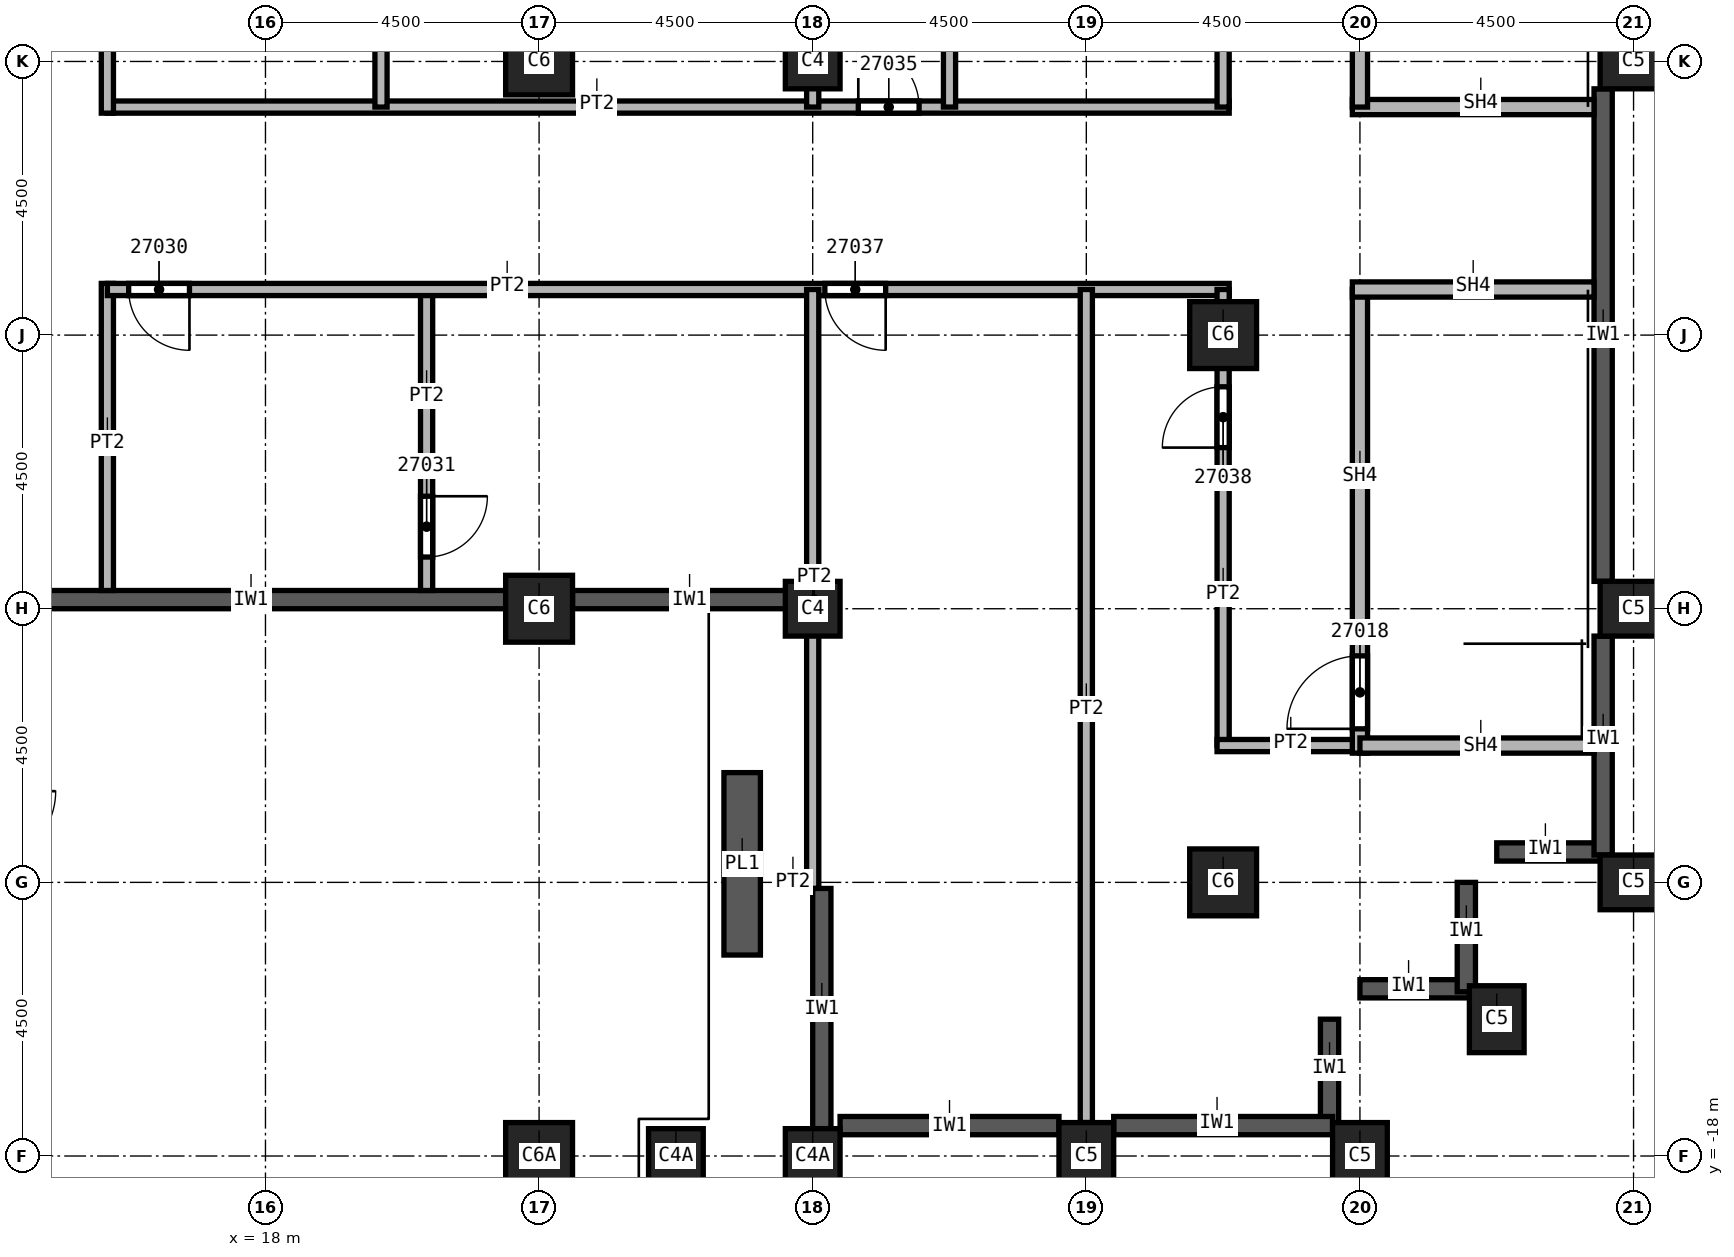
"""IFC4 building model, lengths in metres.
Left out: names, types, materials, properties, quantities, classifications, styles, units other than length and angle.
Written with IfcOpenShell. Run it as: python <this file> out.ifc"""

import sys

from ifc_helpers import new_model, si_unit, direction, frame, frame_2d, origin, origin_2d, place, context, subcontext, project, spatial, rectangle, extrude, element, fill, save


model = new_model("IFC4")
c1 = context("Model", 3, precision=1e-05, world=origin(), true_north=direction((0.0, 1.0)))
c2 = subcontext(c1, "Body", "Model", "MODEL_VIEW")
j1 = project(units=[si_unit("LENGTHUNIT", "METRE"), si_unit("PLANEANGLEUNIT", "RADIAN")], contexts=[c1])
p1 = place(None, origin())
s1 = spatial("IfcSite", under=j1, at=p1, CompositionType="ELEMENT")
p2 = place(p1, origin())
s2 = spatial("IfcBuilding", under=s1, at=p2, CompositionType="ELEMENT")
p3 = place(p2, frame((0.0, 0.0, 178.0)))
s3 = spatial("IfcBuildingStorey", under=s2, at=p3, CompositionType="ELEMENT", Elevation=178.0)
for number, where, z_axis, x_axis in (
    (1, (40.5, 0.0, 0.0), (0.0, 0.0, 1.0), (0.0, 1.0, 0.0)),
    (2, (40.5, -9.0, 0.0), (0.0, 0.0, 1.0), (0.0, 1.0, 0.0)),
    (3, (40.5, -13.5, 0.0), (0.0, 0.0, 1.0), (0.0, 1.0, 0.0)),
    (4, (38.25, -15.75, 0.0), (0.0, 0.0, 1.0), (1.0, 0.0, 0.0)),
    (5, (31.5, -18.0, 0.0), (0.0, 0.0, 1.0), (1.0, 0.0, 0.0)),
    (6, (36.0, -18.0, 0.0), (0.0, 0.0, 1.0), (1.0, 0.0, 0.0)),
):
    element("IfcColumn", number, at=place(p3, frame(where, z_axis=z_axis, x_axis=x_axis)), inside=s3, PredefinedType="COLUMN", context=c2, shape_type="SweptSolid", body=[
        extrude(rectangle(XDim=0.9, YDim=1.1, at=origin_2d()), origin(), (0.0, 0.0, 1.0), 5.72),
    ])
for number, where, z_axis, x_axis in (
    (7, (33.75, -4.5, 0.0), (0.0, 0.0, 1.0), (1.0, 0.0, 0.0)),
    (8, (33.75, -13.5, 0.0), (0.0, 0.0, 1.0), (1.0, 0.0, 0.0)),
    (9, (22.5, 0.0, 0.0), (0.0, 0.0, 1.0), (1.0, 0.0, 0.0)),
    (10, (22.5, -9.0, 0.0), (0.0, 0.0, 1.0), (1.0, 0.0, 0.0)),
):
    element("IfcColumn", number, at=place(p3, frame(where, z_axis=z_axis, x_axis=x_axis)), inside=s3, PredefinedType="COLUMN", context=c2, shape_type="SweptSolid", body=[
        extrude(rectangle(XDim=1.1, YDim=1.1, at=origin_2d()), origin(), (0.0, 0.0, 1.0), 5.72),
    ])
p4 = place(p3, frame((22.5, -18.0, 0.0), z_axis=(0.0, 0.0, 1.0), x_axis=(1.0, 0.0, 0.0)))
e11 = element("IfcColumn", 11, at=p4, inside=s3, PredefinedType="COLUMN", context=c2, shape_type="SweptSolid", body=[
    extrude(rectangle(XDim=1.1, YDim=1.1, at=origin_2d()), origin(), (0.0, 0.0, 1.0), 6.0),
])
for number, where, z_axis, x_axis in (
    (12, (27.0, 0.0, 0.0), (0.0, 0.0, 1.0), (1.0, 0.0, 0.0)),
    (13, (27.0, -9.0, 0.0), (0.0, 0.0, 1.0), (1.0, 0.0, 0.0)),
):
    element("IfcColumn", number, at=place(p3, frame(where, z_axis=z_axis, x_axis=x_axis)), inside=s3, PredefinedType="COLUMN", context=c2, shape_type="SweptSolid", body=[
        extrude(rectangle(XDim=0.9, YDim=0.9, at=origin_2d()), origin(), (0.0, 0.0, 1.0), 5.72),
    ])
for number, where, z_axis, x_axis in (
    (14, (27.0, -18.0, 0.0), (0.0, 0.0, 1.0), (1.0, 0.0, 0.0)),
    (15, (24.75, -18.0, 0.0), (0.0, 0.0, 1.0), (1.0, 0.0, 0.0)),
):
    element("IfcColumn", number, at=place(p3, frame(where, z_axis=z_axis, x_axis=x_axis)), inside=s3, PredefinedType="COLUMN", context=c2, shape_type="SweptSolid", body=[
        extrude(rectangle(XDim=0.9, YDim=0.9, at=origin_2d()), origin(), (0.0, 0.0, 1.0), 6.0),
    ])
for number, where, z_axis, x_axis in (
    (16, (35.5, -17.55, 0.0), (0.0, 0.0, 1.0), (0.0, 1.0, 0.0)),
    (17, (37.8, -15.25, 0.0), (0.0, 0.0, 1.0), (-1.0, 0.0, 0.0)),
    (18, (37.75, -15.3, 0.0), (0.0, 0.0, 1.0), (0.0, 1.0, 0.0)),
):
    element("IfcWall", number, at=place(p3, frame(where, z_axis=z_axis, x_axis=x_axis)), inside=s3, PredefinedType="SOLIDWALL", context=c2, shape_type="SweptSolid", body=[
        extrude(rectangle(XDim=1.8, YDim=0.3, at=frame_2d((0.9, 0.0))), origin(), (0.0, 0.0, 1.0), 5.12),
    ])
p5 = place(p3, frame((39.95, -13.0, 0.0), z_axis=(0.0, 0.0, 1.0), x_axis=(-1.0, 0.0, 0.0)))
e19 = element("IfcWall", 19, at=p5, inside=s3, PredefinedType="SOLIDWALL", context=c2, shape_type="SweptSolid", body=[
    extrude(rectangle(XDim=1.7, YDim=0.3, at=frame_2d((0.85, 0.0))), origin(), (0.0, 0.0, 1.0), 5.12),
])
for number, where, z_axis, x_axis in (
    (20, (27.45, -17.5, 0.0), (0.0, 0.0, 1.0), (1.0, 0.0, 0.0)),
    (21, (31.95, -17.5, 0.0), (0.0, 0.0, 1.0), (1.0, 0.0, 0.0)),
    (22, (40.0, -13.05, 0.0), (0.0, 0.0, 1.0), (0.0, 1.0, 0.0)),
):
    element("IfcWall", number, at=place(p3, frame(where, z_axis=z_axis, x_axis=x_axis)), inside=s3, PredefinedType="SOLIDWALL", context=c2, shape_type="SweptSolid", body=[
        extrude(rectangle(XDim=3.6, YDim=0.3, at=frame_2d((1.8, 0.0))), origin(), (0.0, 0.0, 1.0), 5.12),
    ])
p6 = place(p3, frame((40.0, -8.55, 0.0), z_axis=(0.0, 0.0, 1.0), x_axis=(0.0, 1.0, 0.0)))
e23 = element("IfcWall", 23, at=p6, inside=s3, PredefinedType="SOLIDWALL", context=c2, shape_type="SweptSolid", body=[
    extrude(rectangle(XDim=8.1, YDim=0.3, at=frame_2d((4.05, 0.0))), origin(), (0.0, 0.0, 1.0), 5.12),
])
p7 = place(p3, frame((13.525, -8.85, 0.0), z_axis=(0.0, 0.0, 1.0), x_axis=(1.0, 0.0, 0.0)))
e24 = element("IfcWall", 24, at=p7, inside=s3, PredefinedType="SOLIDWALL", context=c2, shape_type="SweptSolid", body=[
    extrude(rectangle(XDim=8.425, YDim=0.3, at=frame_2d((4.212, 0.0))), origin(), (0.0, 0.0, 1.0), 5.12),
])
p8 = place(p3, frame((23.05, -8.85, 0.0), z_axis=(0.0, 0.0, 1.0), x_axis=(1.0, 0.0, 0.0)))
e25 = element("IfcWall", 25, at=p8, inside=s3, PredefinedType="SOLIDWALL", context=c2, shape_type="SweptSolid", body=[
    extrude(rectangle(XDim=3.9, YDim=0.3, at=frame_2d((1.95, 0.0))), origin(), (0.0, 0.0, 1.0), 5.12),
])
p9 = place(p3, frame((25.84, -11.695, 0.0), z_axis=(0.0, 0.0, 1.0), x_axis=(0.0, -1.0, 0.0)))
e26 = element("IfcWall", 26, at=p9, inside=s3, PredefinedType="SOLIDWALL", context=c2, shape_type="SweptSolid", body=[
    extrude(rectangle(XDim=3.0, YDim=0.6, at=frame_2d((1.5, 0.0))), origin(), (0.0, 0.0, 1.0), 0.54),
])
p10 = place(p3, frame((15.4, -3.65, 0.0), z_axis=(0.0, 0.0, 1.0), x_axis=(0.0, -1.0, 0.0)))
e27 = element("IfcWall", 27, at=p10, inside=s3, PredefinedType="PARTITIONING", context=c2, shape_type="SweptSolid", body=[
    extrude(rectangle(XDim=5.05, YDim=0.2, at=frame_2d((2.525, 0.0))), origin(), (0.0, 0.0, 1.0), 5.72),
])
p11 = place(p3, frame((15.4, -0.75, 0.0), z_axis=(0.0, 0.0, 1.0), x_axis=(1.0, 0.0, 0.0)))
e28 = element("IfcWall", 28, at=p11, inside=s3, PredefinedType="PARTITIONING", context=c2, shape_type="SweptSolid", body=[
    extrude(rectangle(XDim=18.45, YDim=0.2, at=frame_2d((9.225, 0.0))), origin(), (0.0, 0.0, 1.0), 5.72),
])
p12 = place(p11, frame((12.35, 0.0, 0.0)))
e29 = element("IfcOpeningElement", 29, at=p12, cuts=e28, PredefinedType="OPENING", context=c2, shape_type="SweptSolid", body=[
    extrude(rectangle(XDim=1.0, YDim=2.1, at=frame_2d((0.5, 1.05))), frame((0.0, 0.1, 0.0), z_axis=(0.0, -1.0, 0.0), x_axis=(1.0, 0.0, 0.0)), (0.0, 0.0, 1.0), 0.2),
])
p13 = place(p3, frame((15.4, 22.95, 0.0), z_axis=(0.0, 0.0, 1.0), x_axis=(0.0, -1.0, 0.0)))
e30 = element("IfcWall", 30, at=p13, inside=s3, PredefinedType="PARTITIONING", context=c2, shape_type="SweptSolid", body=[
    extrude(rectangle(XDim=23.8, YDim=0.2, at=frame_2d((11.9, 0.0))), origin(), (0.0, 0.0, 1.0), 5.72),
])
p14 = place(p13, frame((18.3, 0.0, 0.0)))
e31 = element("IfcOpeningElement", 31, at=p14, cuts=e30, PredefinedType="OPENING", context=c2, shape_type="SweptSolid", body=[
    extrude(rectangle(XDim=1.0, YDim=2.1, at=frame_2d((0.5, 1.05))), frame((0.0, 0.1, 0.0), z_axis=(0.0, -1.0, 0.0), x_axis=(1.0, 0.0, 0.0)), (0.0, 0.0, 1.0), 0.2),
])
p15 = place(p13, frame((9.6, 0.0, 0.0)))
e32 = element("IfcOpeningElement", 32, at=p15, cuts=e30, PredefinedType="OPENING", context=c2, shape_type="SweptSolid", body=[
    extrude(rectangle(XDim=1.0, YDim=2.1, at=frame_2d((0.5, 1.05))), frame((0.0, 0.1, 0.0), z_axis=(0.0, -1.0, 0.0), x_axis=(1.0, 0.0, 0.0)), (0.0, 0.0, 1.0), 0.2),
])
p16 = place(p13, frame((1.6, 0.0, 0.0)))
e33 = element("IfcOpeningElement", 33, at=p16, cuts=e30, PredefinedType="OPENING", context=c2, shape_type="SweptSolid", body=[
    extrude(rectangle(XDim=1.0, YDim=2.1, at=frame_2d((0.5, 1.05))), frame((0.0, 0.1, 0.0), z_axis=(0.0, -1.0, 0.0), x_axis=(1.0, 0.0, 0.0)), (0.0, 0.0, 1.0), 0.2),
])
p17 = place(p3, frame((19.9, 9.1, 0.0), z_axis=(0.0, 0.0, 1.0), x_axis=(0.0, -1.0, 0.0)))
e34 = element("IfcWall", 34, at=p17, inside=s3, PredefinedType="PARTITIONING", context=c2, shape_type="SweptSolid", body=[
    extrude(rectangle(XDim=9.85, YDim=0.2, at=frame_2d((4.925, 0.0))), origin(), (0.0, 0.0, 1.0), 5.72),
])
p18 = place(p17, frame((3.55, 0.0, 0.0)))
e35 = element("IfcOpeningElement", 35, at=p18, cuts=e34, PredefinedType="OPENING", context=c2, shape_type="SweptSolid", body=[
    extrude(rectangle(XDim=1.0, YDim=2.1, at=frame_2d((0.5, 1.05))), frame((0.0, 0.1, 0.0), z_axis=(0.0, -1.0, 0.0), x_axis=(1.0, 0.0, 0.0)), (0.0, 0.0, 1.0), 0.2),
])
p19 = place(p3, frame((20.65, -3.75, 0.0), z_axis=(0.0, 0.0, 1.0), x_axis=(0.0, -1.0, 0.0)))
e36 = element("IfcWall", 36, at=p19, inside=s3, PredefinedType="PARTITIONING", context=c2, shape_type="SweptSolid", body=[
    extrude(rectangle(XDim=4.95, YDim=0.2, at=frame_2d((2.475, 0.0))), origin(), (0.0, 0.0, 1.0), 5.72),
])
p20 = place(p19, frame((3.4, 0.0, 0.0)))
e37 = element("IfcOpeningElement", 37, at=p20, cuts=e36, PredefinedType="OPENING", context=c2, shape_type="SweptSolid", body=[
    extrude(rectangle(XDim=1.0, YDim=2.1, at=frame_2d((0.5, 1.05))), frame((0.0, 0.1, 0.0), z_axis=(0.0, -1.0, 0.0), x_axis=(1.0, 0.0, 0.0)), (0.0, 0.0, 1.0), 0.2),
])
p21 = place(p3, frame((33.85, -3.75, 0.0), z_axis=(0.0, 0.0, 1.0), x_axis=(-1.0, 0.0, 0.0)))
e38 = element("IfcWall", 38, at=p21, inside=s3, PredefinedType="PARTITIONING", context=c2, shape_type="SweptSolid", body=[
    extrude(rectangle(XDim=18.45, YDim=0.2, at=frame_2d((9.225, 0.0))), origin(), (0.0, 0.0, 1.0), 5.72),
])
p22 = place(p21, frame((17.1, 0.0, 0.0)))
e39 = element("IfcOpeningElement", 39, at=p22, cuts=e38, PredefinedType="OPENING", context=c2, shape_type="SweptSolid", body=[
    extrude(rectangle(XDim=1.0, YDim=2.1, at=frame_2d((0.5, 1.05))), frame((0.0, 0.1, 0.0), z_axis=(0.0, -1.0, 0.0), x_axis=(1.0, 0.0, 0.0)), (0.0, 0.0, 1.0), 0.2),
])
p23 = place(p21, frame((5.65, 0.0, 0.0)))
e40 = element("IfcOpeningElement", 40, at=p23, cuts=e38, PredefinedType="OPENING", context=c2, shape_type="SweptSolid", body=[
    extrude(rectangle(XDim=1.0, YDim=2.1, at=frame_2d((0.5, 1.05))), frame((0.0, 0.1, 0.0), z_axis=(0.0, -1.0, 0.0), x_axis=(1.0, 0.0, 0.0)), (0.0, 0.0, 1.0), 0.2),
])
p24 = place(p3, frame((27.0, -13.5, 0.0), z_axis=(0.0, 0.0, 1.0), x_axis=(-1.0, 0.0, 0.0)))
e41 = element("IfcWall", 41, at=p24, inside=s3, PredefinedType="PARTITIONING", context=c2, shape_type="SweptSolid", body=[
    extrude(rectangle(XDim=0.55, YDim=0.2, at=frame_2d((0.275, 0.0))), origin(), (0.0, 0.0, 1.0), 5.72),
])
p25 = place(p3, frame((27.0, -3.75, 0.0), z_axis=(0.0, 0.0, 1.0), x_axis=(0.0, -1.0, 0.0)))
e42 = element("IfcWall", 42, at=p25, inside=s3, PredefinedType="PARTITIONING", context=c2, shape_type="SweptSolid", body=[
    extrude(rectangle(XDim=9.85, YDim=0.2, at=frame_2d((4.925, 0.0))), origin(), (0.0, 0.0, 1.0), 5.72),
])
p26 = place(p3, frame((27.0, 17.45, 0.0), z_axis=(0.0, 0.0, 1.0), x_axis=(0.0, -1.0, 0.0)))
e43 = element("IfcWall", 43, at=p26, inside=s3, PredefinedType="PARTITIONING", context=c2, shape_type="SweptSolid", body=[
    extrude(rectangle(XDim=18.2, YDim=0.2, at=frame_2d((9.1, 0.0))), origin(), (0.0, 0.0, 1.0), 5.72),
])
p27 = place(p3, frame((29.25, 17.35, 0.0), z_axis=(0.0, 0.0, 1.0), x_axis=(0.0, -1.0, 0.0)))
e44 = element("IfcWall", 44, at=p27, inside=s3, PredefinedType="PARTITIONING", context=c2, shape_type="SweptSolid", body=[
    extrude(rectangle(XDim=18.1, YDim=0.2, at=frame_2d((9.05, 0.0))), origin(), (0.0, 0.0, 1.0), 5.72),
])
p28 = place(p3, frame((31.5, -3.75, 0.0), z_axis=(0.0, 0.0, 1.0), x_axis=(0.0, -1.0, 0.0)))
e45 = element("IfcWall", 45, at=p28, inside=s3, PredefinedType="PARTITIONING", context=c2, shape_type="SweptSolid", body=[
    extrude(rectangle(XDim=13.7, YDim=0.2, at=frame_2d((6.85, 0.0))), origin(), (0.0, 0.0, 1.0), 5.72),
])
p29 = place(p3, frame((33.75, -11.25, 0.0), z_axis=(0.0, 0.0, 1.0), x_axis=(0.0, 1.0, 0.0)))
e46 = element("IfcWall", 46, at=p29, inside=s3, PredefinedType="PARTITIONING", context=c2, shape_type="SweptSolid", body=[
    extrude(rectangle(XDim=7.5, YDim=0.2, at=frame_2d((3.75, 0.0))), origin(), (0.0, 0.0, 1.0), 5.72),
])
p30 = place(p29, frame((4.9, 0.0, 0.0)))
e47 = element("IfcOpeningElement", 47, at=p30, cuts=e46, PredefinedType="OPENING", context=c2, shape_type="SweptSolid", body=[
    extrude(rectangle(XDim=1.0, YDim=2.1, at=frame_2d((0.5, 1.05))), frame((0.0, 0.1, 0.0), z_axis=(0.0, -1.0, 0.0), x_axis=(1.0, 0.0, 0.0)), (0.0, 0.0, 1.0), 0.2),
])
p31 = place(p3, frame((33.75, -0.75, 0.0), z_axis=(0.0, 0.0, 1.0), x_axis=(0.0, 1.0, 0.0)))
e48 = element("IfcWall", 48, at=p31, inside=s3, PredefinedType="PARTITIONING", context=c2, shape_type="SweptSolid", body=[
    extrude(rectangle(XDim=7.5, YDim=0.2, at=frame_2d((3.75, 0.0))), origin(), (0.0, 0.0, 1.0), 5.72),
])
p32 = place(p3, frame((36.0, -11.25, 0.0), z_axis=(0.0, 0.0, 1.0), x_axis=(-1.0, 0.0, 0.0)))
e49 = element("IfcWall", 49, at=p32, inside=s3, PredefinedType="PARTITIONING", context=c2, shape_type="SweptSolid", body=[
    extrude(rectangle(XDim=2.35, YDim=0.2, at=frame_2d((1.175, 0.0))), origin(), (0.0, 0.0, 1.0), 5.72),
])
p33 = place(p3, frame((35.875, -0.75, 0.0), z_axis=(0.0, 0.0, 1.0), x_axis=(1.0, 0.0, 0.0)))
e50 = element("IfcWall", 50, at=p33, inside=s3, PredefinedType="SOLIDWALL", context=c2, shape_type="SweptSolid", body=[
    extrude(rectangle(XDim=3.975, YDim=0.25, at=frame_2d((1.988, 0.0))), origin(), (0.0, 0.0, 1.0), 5.72),
])
p34 = place(p3, frame((36.0, -11.375, 0.0), z_axis=(0.0, 0.0, 1.0), x_axis=(0.0, 1.0, 0.0)))
e51 = element("IfcWall", 51, at=p34, inside=s3, PredefinedType="SOLIDWALL", context=c2, shape_type="SweptSolid", body=[
    extrude(rectangle(XDim=7.625, YDim=0.25, at=frame_2d((3.812, 0.0))), origin(), (0.0, 0.0, 1.0), 5.72),
])
p35 = place(p34, frame((0.4, 0.0, 0.0)))
e52 = element("IfcOpeningElement", 52, at=p35, cuts=e51, PredefinedType="OPENING", context=c2, shape_type="SweptSolid", body=[
    extrude(rectangle(XDim=1.2, YDim=2.1, at=frame_2d((0.6, 1.05))), frame((0.0, 0.125, 0.0), z_axis=(0.0, -1.0, 0.0), x_axis=(1.0, 0.0, 0.0)), (0.0, 0.0, 1.0), 0.25),
])
p36 = place(p3, frame((36.0, -0.75, 0.0), z_axis=(0.0, 0.0, 1.0), x_axis=(0.0, 1.0, 0.0)))
e53 = element("IfcWall", 53, at=p36, inside=s3, PredefinedType="SOLIDWALL", context=c2, shape_type="SweptSolid", body=[
    extrude(rectangle(XDim=7.625, YDim=0.25, at=frame_2d((3.812, 0.0))), origin(), (0.0, 0.0, 1.0), 5.72),
])
p37 = place(p36, frame((5.95, 0.0, 0.0)))
e54 = element("IfcOpeningElement", 54, at=p37, cuts=e53, PredefinedType="OPENING", context=c2, shape_type="SweptSolid", body=[
    extrude(rectangle(XDim=1.2, YDim=2.1, at=frame_2d((0.6, 1.05))), frame((0.0, 0.125, 0.0), z_axis=(0.0, -1.0, 0.0), x_axis=(1.0, 0.0, 0.0)), (0.0, 0.0, 1.0), 0.25),
])
p38 = place(p3, frame((39.85, -11.25, 0.0), z_axis=(0.0, 0.0, 1.0), x_axis=(-1.0, 0.0, 0.0)))
e55 = element("IfcWall", 55, at=p38, inside=s3, PredefinedType="SOLIDWALL", context=c2, shape_type="SweptSolid", body=[
    extrude(rectangle(XDim=3.85, YDim=0.25, at=frame_2d((1.925, 0.0))), origin(), (0.0, 0.0, 1.0), 5.72),
])
p39 = place(p3, frame((39.85, -3.75, 0.0), z_axis=(0.0, 0.0, 1.0), x_axis=(-1.0, 0.0, 0.0)))
e56 = element("IfcWall", 56, at=p39, inside=s3, PredefinedType="SOLIDWALL", context=c2, shape_type="SweptSolid", body=[
    extrude(rectangle(XDim=3.975, YDim=0.25, at=frame_2d((1.988, 0.0))), origin(), (0.0, 0.0, 1.0), 5.72),
])
p40 = place(p3, frame((27.15, -17.55, 0.0), z_axis=(0.0, 0.0, 1.0), x_axis=(0.0, 1.0, 0.0)))
e57 = element("IfcWall", 57, at=p40, inside=s3, PredefinedType="SOLIDWALL", context=c2, shape_type="SweptSolid", body=[
    extrude(rectangle(XDim=3.95, YDim=0.3, at=frame_2d((1.975, 0.0))), origin(), (0.0, 0.0, 1.0), 5.12),
])
p41 = place(p35, origin())
e58 = element("IfcDoor", 58, at=p41, inside=s3, OperationType="SINGLE_SWING_LEFT", PredefinedType="DOOR", context=c2, shape_type="SweptSolid", body=[
    extrude(rectangle(XDim=1.2, YDim=2.1, at=frame_2d((0.6, 1.05))), frame((0.0, 0.025, 0.0), z_axis=(0.0, -1.0, 0.0), x_axis=(1.0, 0.0, 0.0)), (0.0, 0.0, 1.0), 0.05),
])
fill(e52, e58)
p42 = place(p22, origin())
e59 = element("IfcDoor", 59, at=p42, inside=s3, OperationType="SINGLE_SWING_LEFT", PredefinedType="DOOR", context=c2, shape_type="SweptSolid", body=[
    extrude(rectangle(XDim=1.0, YDim=2.1, at=frame_2d((0.5, 1.05))), frame((0.0, 0.025, 0.0), z_axis=(0.0, -1.0, 0.0), x_axis=(1.0, 0.0, 0.0)), (0.0, 0.0, 1.0), 0.05),
])
fill(e39, e59)
p43 = place(p20, origin())
e60 = element("IfcDoor", 60, at=p43, inside=s3, OperationType="SINGLE_SWING_RIGHT", PredefinedType="DOOR", context=c2, shape_type="SweptSolid", body=[
    extrude(rectangle(XDim=1.0, YDim=2.1, at=frame_2d((0.5, 1.05))), frame((0.0, 0.025, 0.0), z_axis=(0.0, -1.0, 0.0), x_axis=(1.0, 0.0, 0.0)), (0.0, 0.0, 1.0), 0.05),
])
fill(e37, e60)
p44 = place(p12, origin())
e61 = element("IfcDoor", 61, at=p44, inside=s3, OperationType="SINGLE_SWING_RIGHT", PredefinedType="DOOR", context=c2, shape_type="SweptSolid", body=[
    extrude(rectangle(XDim=1.0, YDim=2.1, at=frame_2d((0.5, 1.05))), frame((0.0, 0.025, 0.0), z_axis=(0.0, -1.0, 0.0), x_axis=(1.0, 0.0, 0.0)), (0.0, 0.0, 1.0), 0.05),
])
fill(e29, e61)
p45 = place(p23, origin())
e62 = element("IfcDoor", 62, at=p45, inside=s3, OperationType="SINGLE_SWING_RIGHT", PredefinedType="DOOR", context=c2, shape_type="SweptSolid", body=[
    extrude(rectangle(XDim=1.0, YDim=2.1, at=frame_2d((0.5, 1.05))), frame((0.0, 0.025, 0.0), z_axis=(0.0, -1.0, 0.0), x_axis=(1.0, 0.0, 0.0)), (0.0, 0.0, 1.0), 0.05),
])
fill(e40, e62)
p46 = place(p30, origin())
e63 = element("IfcDoor", 63, at=p46, inside=s3, OperationType="SINGLE_SWING_LEFT", PredefinedType="DOOR", context=c2, shape_type="SweptSolid", body=[
    extrude(rectangle(XDim=1.0, YDim=2.1, at=frame_2d((0.5, 1.05))), frame((0.0, 0.025, 0.0), z_axis=(0.0, -1.0, 0.0), x_axis=(1.0, 0.0, 0.0)), (0.0, 0.0, 1.0), 0.05),
])
fill(e47, e63)
save(model, sys.argv[1])
